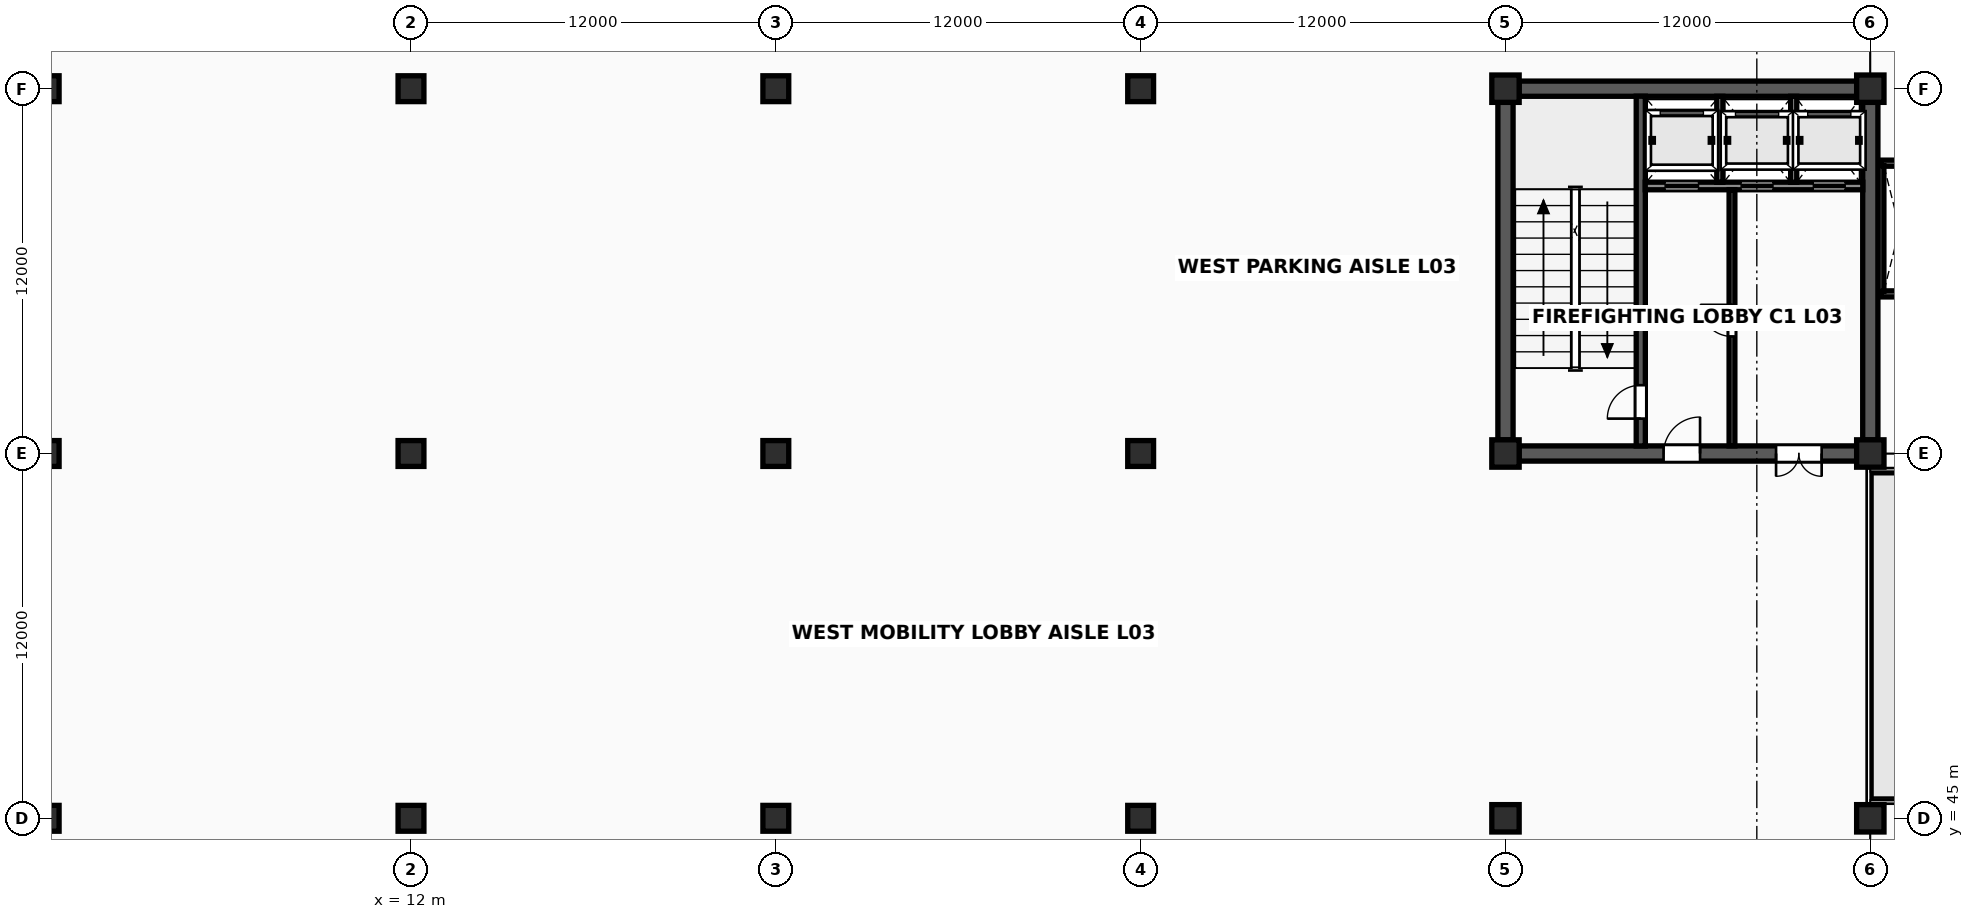
"""IFC4 building model, lengths in metres.
Left out: names, types, materials, properties, quantities, classifications, styles, units other than length and angle.
Written with IfcOpenShell. Run it as: python <this file> out.ifc"""

import sys

from ifc_helpers import new_model, si_unit, direction, frame, frame_2d, origin, origin_2d, place, context, subcontext, project, spatial, rectangle, extrude, element, fill, save


model = new_model("IFC4")
c1 = context("Model", 3, precision=1e-05, world=origin(), true_north=direction((0.0, 1.0)))
c2 = subcontext(c1, "Body", "Model", "MODEL_VIEW")
j1 = project(units=[si_unit("LENGTHUNIT", "METRE"), si_unit("PLANEANGLEUNIT", "RADIAN")], contexts=[c1])
p1 = place(None, origin())
s1 = spatial("IfcSite", under=j1, at=p1, CompositionType="ELEMENT")
p2 = place(p1, origin())
s2 = spatial("IfcBuilding", under=s1, at=p2, CompositionType="ELEMENT")
p3 = place(p2, frame((0.0, 0.0, 13.4)))
s3 = spatial("IfcBuildingStorey", under=s2, at=p3, CompositionType="ELEMENT", Elevation=13.4)
for number, where, z_axis, x_axis in (
    (1, (0.0, 45.0, 0.0), (0.0, 0.0, 1.0), (1.0, 0.0, 0.0)),
    (2, (0.0, 57.0, 0.0), (0.0, 0.0, 1.0), (1.0, 0.0, 0.0)),
    (3, (0.0, 69.0, 0.0), (0.0, 0.0, 1.0), (1.0, 0.0, 0.0)),
    (4, (12.0, 45.0, 0.0), (0.0, 0.0, 1.0), (1.0, 0.0, 0.0)),
    (5, (12.0, 57.0, 0.0), (0.0, 0.0, 1.0), (1.0, 0.0, 0.0)),
    (6, (12.0, 69.0, 0.0), (0.0, 0.0, 1.0), (1.0, 0.0, 0.0)),
    (7, (24.0, 45.0, 0.0), (0.0, 0.0, 1.0), (1.0, 0.0, 0.0)),
    (8, (24.0, 57.0, 0.0), (0.0, 0.0, 1.0), (1.0, 0.0, 0.0)),
    (9, (24.0, 69.0, 0.0), (0.0, 0.0, 1.0), (1.0, 0.0, 0.0)),
    (10, (36.0, 45.0, 0.0), (0.0, 0.0, 1.0), (1.0, 0.0, 0.0)),
    (11, (36.0, 57.0, 0.0), (0.0, 0.0, 1.0), (1.0, 0.0, 0.0)),
    (12, (36.0, 69.0, 0.0), (0.0, 0.0, 1.0), (1.0, 0.0, 0.0)),
):
    element("IfcColumn", number, at=place(p3, frame(where, z_axis=z_axis, x_axis=x_axis)), inside=s3, PredefinedType="COLUMN", context=c2, shape_type="SweptSolid", body=[
        extrude(rectangle(XDim=0.85, YDim=0.85, at=origin_2d()), origin(), (0.0, 0.0, 1.0), 3.8),
    ])
for number, where, z_axis, x_axis in (
    (13, (48.0, 45.0, 0.0), (0.0, 0.0, 1.0), (1.0, 0.0, 0.0)),
    (14, (48.0, 57.0, 0.0), (0.0, 0.0, 1.0), (1.0, 0.0, 0.0)),
    (15, (48.0, 69.0, 0.0), (0.0, 0.0, 1.0), (1.0, 0.0, 0.0)),
    (16, (60.0, 45.0, 0.0), (0.0, 0.0, 1.0), (1.0, 0.0, 0.0)),
    (17, (60.0, 57.0, 0.0), (0.0, 0.0, 1.0), (1.0, 0.0, 0.0)),
    (18, (60.0, 69.0, 0.0), (0.0, 0.0, 1.0), (1.0, 0.0, 0.0)),
):
    element("IfcColumn", number, at=place(p3, frame(where, z_axis=z_axis, x_axis=x_axis)), inside=s3, PredefinedType="COLUMN", context=c2, shape_type="SweptSolid", body=[
        extrude(rectangle(XDim=0.9, YDim=0.9, at=origin_2d()), origin(), (0.0, 0.0, 1.0), 3.8),
    ])
for number, where, z_axis, x_axis in (
    (19, (60.347, 62.25, 0.0), (0.0, 0.0, 1.0), (1.0, 0.0, 0.0)),
    (20, (60.347, 66.55, 0.0), (0.0, 0.0, 1.0), (1.0, 0.0, 0.0)),
):
    element("IfcWall", number, at=place(p3, frame(where, z_axis=z_axis, x_axis=x_axis)), inside=s3, PredefinedType="SOLIDWALL", context=c2, shape_type="SweptSolid", body=[
        extrude(rectangle(XDim=1.233, YDim=0.2, at=frame_2d((0.617, 0.0))), origin(), (0.0, 0.0, 1.0), 3.618),
    ])
p4 = place(p3, frame((60.347, 62.33, 0.0), z_axis=(0.0, 0.0, 1.0), x_axis=(0.0, 1.0, 0.0)))
e21 = element("IfcWall", 21, at=p4, inside=s3, PredefinedType="SOLIDWALL", context=c2, shape_type="SweptSolid", body=[
    extrude(rectangle(XDim=4.14, YDim=0.2, at=frame_2d((2.07, 0.0))), origin(), (0.0, 0.0, 1.0), 3.618),
])
p5 = place(p3, frame((48.447, 57.0, 0.0), z_axis=(0.0, 0.0, 1.0), x_axis=(1.0, 0.0, 0.0)))
e22 = element("IfcWall", 22, at=p5, inside=s3, PredefinedType="SHEAR", context=c2, shape_type="SweptSolid", body=[
    extrude(rectangle(XDim=11.106, YDim=0.5, at=frame_2d((5.553, 0.0))), origin(), (0.0, 0.0, 1.0), 3.618),
])
p6 = place(p5, frame((4.753, 0.0, 0.0)))
e23 = element("IfcOpeningElement", 23, at=p6, cuts=e22, PredefinedType="OPENING", context=c2, shape_type="SweptSolid", body=[
    extrude(rectangle(XDim=1.2, YDim=2.2, at=frame_2d((0.6, 1.1))), frame((0.0, 0.265, 0.0), z_axis=(0.0, -1.0, 0.0), x_axis=(1.0, 0.0, 0.0)), (0.0, 0.0, 1.0), 0.53),
])
p7 = place(p5, frame((8.453, 0.0, 0.0)))
e24 = element("IfcOpeningElement", 24, at=p7, cuts=e22, PredefinedType="OPENING", context=c2, shape_type="SweptSolid", body=[
    extrude(rectangle(XDim=1.5, YDim=2.25, at=frame_2d((0.75, 1.125))), frame((0.0, 0.265, 0.0), z_axis=(0.0, -1.0, 0.0), x_axis=(1.0, 0.0, 0.0)), (0.0, 0.0, 1.0), 0.53),
])
for number, where, z_axis, x_axis in (
    (25, (48.447, 69.0, 0.0), (0.0, 0.0, 1.0), (1.0, 0.0, 0.0)),
    (26, (48.0, 57.447, 0.0), (0.0, 0.0, 1.0), (0.0, 1.0, 0.0)),
    (27, (60.0, 57.447, 0.0), (0.0, 0.0, 1.0), (0.0, 1.0, 0.0)),
):
    element("IfcWall", number, at=place(p3, frame(where, z_axis=z_axis, x_axis=x_axis)), inside=s3, PredefinedType="SHEAR", context=c2, shape_type="SweptSolid", body=[
        extrude(rectangle(XDim=11.106, YDim=0.5, at=frame_2d((5.553, 0.0))), origin(), (0.0, 0.0, 1.0), 3.618),
    ])
p8 = place(p3, frame((52.45, 57.247, 0.0), z_axis=(0.0, 0.0, 1.0), x_axis=(0.0, 1.0, 0.0)))
e28 = element("IfcWall", 28, at=p8, inside=s3, PredefinedType="SHEAR", context=c2, shape_type="SweptSolid", body=[
    extrude(rectangle(XDim=11.506, YDim=0.3, at=frame_2d((5.753, 0.0))), origin(), (0.0, 0.0, 1.0), 3.618),
])
p9 = place(p8, frame((0.9, 0.0, 0.0)))
e29 = element("IfcOpeningElement", 29, at=p9, cuts=e28, PredefinedType="OPENING", context=c2, shape_type="SweptSolid", body=[
    extrude(rectangle(XDim=1.1, YDim=2.2, at=frame_2d((0.55, 1.1))), frame((0.0, 0.165, 0.0), z_axis=(0.0, -1.0, 0.0), x_axis=(1.0, 0.0, 0.0)), (0.0, 0.0, 1.0), 0.33),
])
p10 = place(p3, frame((52.597, 65.8, 0.0), z_axis=(0.0, 0.0, 1.0), x_axis=(1.0, 0.0, 0.0)))
e30 = element("IfcWall", 30, at=p10, inside=s3, PredefinedType="SOLIDWALL", context=c2, shape_type="SweptSolid", body=[
    extrude(rectangle(XDim=7.156, YDim=0.25, at=frame_2d((3.578, 0.0))), origin(), (0.0, 0.0, 1.0), 3.618),
])
p11 = place(p10, frame((0.653, 0.0, 0.0)))
e31 = element("IfcOpeningElement", 31, at=p11, cuts=e30, PredefinedType="OPENING", context=c2, shape_type="SweptSolid", body=[
    extrude(rectangle(XDim=1.1, YDim=2.24, at=frame_2d((0.55, 1.12))), frame((0.0, 0.14, 0.0), z_axis=(0.0, -1.0, 0.0), x_axis=(1.0, 0.0, 0.0)), (0.0, 0.0, 1.0), 0.28),
])
p12 = place(p10, frame((3.153, 0.0, 0.0)))
e32 = element("IfcOpeningElement", 32, at=p12, cuts=e30, PredefinedType="OPENING", context=c2, shape_type="SweptSolid", body=[
    extrude(rectangle(XDim=1.05, YDim=2.2, at=frame_2d((0.525, 1.1))), frame((0.0, 0.14, 0.0), z_axis=(0.0, -1.0, 0.0), x_axis=(1.0, 0.0, 0.0)), (0.0, 0.0, 1.0), 0.28),
])
p13 = place(p10, frame((5.528, 0.0, 0.0)))
e33 = element("IfcOpeningElement", 33, at=p13, cuts=e30, PredefinedType="OPENING", context=c2, shape_type="SweptSolid", body=[
    extrude(rectangle(XDim=1.05, YDim=2.2, at=frame_2d((0.525, 1.1))), frame((0.0, 0.14, 0.0), z_axis=(0.0, -1.0, 0.0), x_axis=(1.0, 0.0, 0.0)), (0.0, 0.0, 1.0), 0.28),
])
for number, where, z_axis, x_axis in (
    (34, (55.05, 65.92, 0.0), (0.0, 0.0, 1.0), (0.0, 1.0, 0.0)),
    (35, (57.48, 65.92, 0.0), (0.0, 0.0, 1.0), (0.0, 1.0, 0.0)),
):
    element("IfcWall", number, at=place(p3, frame(where, z_axis=z_axis, x_axis=x_axis)), inside=s3, PredefinedType="SOLIDWALL", context=c2, shape_type="SweptSolid", body=[
        extrude(rectangle(XDim=2.83, YDim=0.2, at=frame_2d((1.415, 0.0))), origin(), (0.0, 0.0, 1.0), 3.608),
    ])
p14 = place(p3, frame((55.45, 57.25, 0.0), z_axis=(0.0, 0.0, 1.0), x_axis=(0.0, 1.0, 0.0)))
e36 = element("IfcWall", 36, at=p14, inside=s3, PredefinedType="SOLIDWALL", context=c2, shape_type="SweptSolid", body=[
    extrude(rectangle(XDim=8.43, YDim=0.19, at=frame_2d((4.215, 0.0))), origin(), (0.0, 0.0, 1.0), 3.608),
])
p15 = place(p14, frame((3.6, 0.0, 0.0)))
e37 = element("IfcOpeningElement", 37, at=p15, cuts=e36, PredefinedType="OPENING", context=c2, shape_type="SweptSolid", body=[
    extrude(rectangle(XDim=1.04, YDim=2.18, at=frame_2d((0.52, 1.09))), frame((0.0, 0.11, 0.0), z_axis=(0.0, -1.0, 0.0), x_axis=(1.0, 0.0, 0.0)), (0.0, 0.0, 1.0), 0.22),
])
p16 = place(p9, origin())
e38 = element("IfcDoor", 38, at=p16, inside=s3, OperationType="SINGLE_SWING_LEFT", PredefinedType="DOOR", context=c2, shape_type="SweptSolid", body=[
    extrude(rectangle(XDim=1.1, YDim=2.2, at=frame_2d((0.55, 1.1))), frame((0.0, 0.025, 0.0), z_axis=(0.0, -1.0, 0.0), x_axis=(1.0, 0.0, 0.0)), (0.0, 0.0, 1.0), 0.05),
])
fill(e29, e38)
p17 = place(p15, origin())
e39 = element("IfcDoor", 39, at=p17, inside=s3, OperationType="SINGLE_SWING_RIGHT", PredefinedType="DOOR", context=c2, shape_type="SweptSolid", body=[
    extrude(rectangle(XDim=1.04, YDim=2.18, at=frame_2d((0.52, 1.09))), frame((0.0, 0.025, 0.0), z_axis=(0.0, -1.0, 0.0), x_axis=(1.0, 0.0, 0.0)), (0.0, 0.0, 1.0), 0.05),
])
fill(e37, e39)
p18 = place(p6, origin())
e40 = element("IfcDoor", 40, at=p18, inside=s3, OperationType="SINGLE_SWING_RIGHT", PredefinedType="DOOR", context=c2, shape_type="SweptSolid", body=[
    extrude(rectangle(XDim=1.2, YDim=2.2, at=frame_2d((0.6, 1.1))), frame((0.0, 0.025, 0.0), z_axis=(0.0, -1.0, 0.0), x_axis=(1.0, 0.0, 0.0)), (0.0, 0.0, 1.0), 0.05),
])
fill(e23, e40)
p19 = place(p7, origin())
e41 = element("IfcDoor", 41, at=p19, inside=s3, OperationType="DOUBLE_DOOR_SINGLE_SWING", PredefinedType="DOOR", context=c2, shape_type="SweptSolid", body=[
    extrude(rectangle(XDim=1.5, YDim=2.25, at=frame_2d((0.75, 1.125))), frame((0.0, 0.025, 0.0), z_axis=(0.0, -1.0, 0.0), x_axis=(1.0, 0.0, 0.0)), (0.0, 0.0, 1.0), 0.05),
])
fill(e24, e41)
p20 = place(p11, origin())
e42 = element("IfcDoor", 42, at=p20, inside=s3, OperationType="SLIDING_TO_LEFT", PredefinedType="USERDEFINED", context=c2, shape_type="SweptSolid", body=[
    extrude(rectangle(XDim=1.1, YDim=2.24, at=frame_2d((0.55, 1.12))), frame((0.0, 0.025, 0.0), z_axis=(0.0, -1.0, 0.0), x_axis=(1.0, 0.0, 0.0)), (0.0, 0.0, 1.0), 0.05),
])
fill(e31, e42)
p21 = place(p12, origin())
e43 = element("IfcDoor", 43, at=p21, inside=s3, OperationType="SLIDING_TO_LEFT", PredefinedType="USERDEFINED", context=c2, shape_type="SweptSolid", body=[
    extrude(rectangle(XDim=1.05, YDim=2.2, at=frame_2d((0.525, 1.1))), frame((0.0, 0.025, 0.0), z_axis=(0.0, -1.0, 0.0), x_axis=(1.0, 0.0, 0.0)), (0.0, 0.0, 1.0), 0.05),
])
fill(e32, e43)
p22 = place(p13, origin())
e44 = element("IfcDoor", 44, at=p22, inside=s3, OperationType="SLIDING_TO_LEFT", PredefinedType="USERDEFINED", context=c2, shape_type="SweptSolid", body=[
    extrude(rectangle(XDim=1.05, YDim=2.2, at=frame_2d((0.525, 1.1))), frame((0.0, 0.025, 0.0), z_axis=(0.0, -1.0, 0.0), x_axis=(1.0, 0.0, 0.0)), (0.0, 0.0, 1.0), 0.05),
])
fill(e33, e44)
save(model, sys.argv[1])
